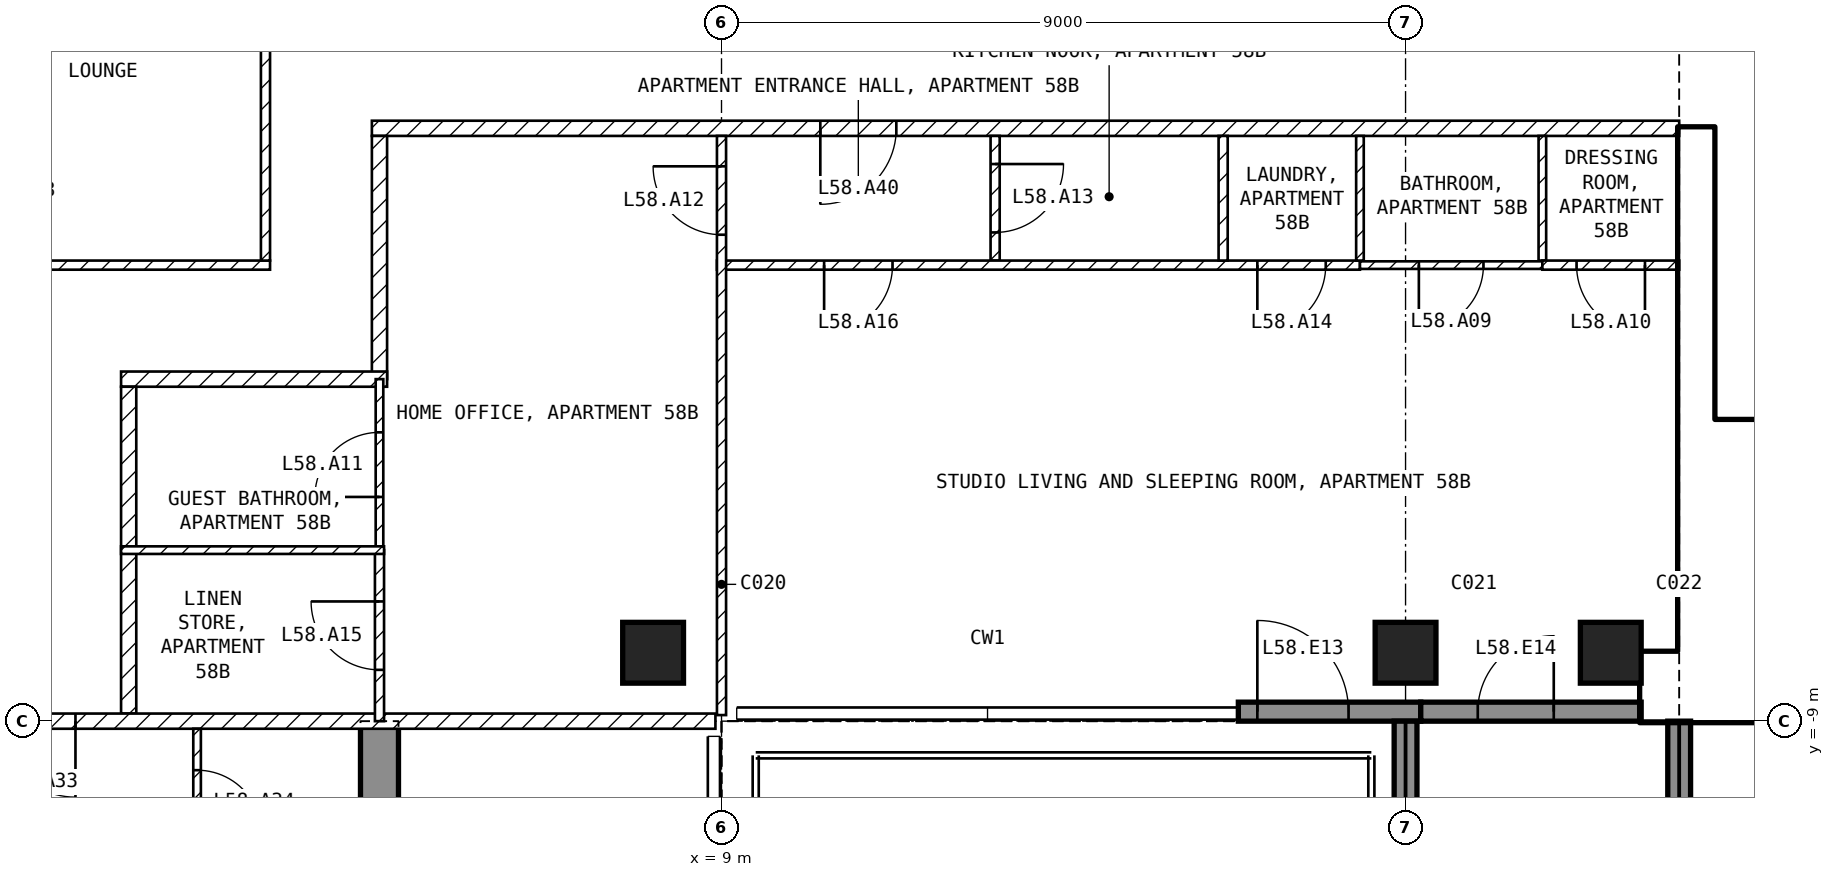
"""IFC4 building model, lengths in metres.
Left out: names, types, materials, properties, quantities, classifications, styles, units other than length and angle.
Written with IfcOpenShell. Run it as: python <this file> out.ifc"""

import sys

from ifc_helpers import new_model, si_unit, direction, frame, frame_2d, origin, origin_2d, place, context, subcontext, project, spatial, polyline, rectangle, outline, extrude, element, fill, save


model = new_model("IFC4")
c1 = context("Model", 3, precision=1e-05, world=origin(), true_north=direction((0.0, 1.0)))
c2 = subcontext(c1, "Body", "Model", "MODEL_VIEW")
j1 = project(units=[si_unit("LENGTHUNIT", "METRE"), si_unit("PLANEANGLEUNIT", "RADIAN")], contexts=[c1])
p1 = place(None, origin())
s1 = spatial("IfcSite", under=j1, at=p1, CompositionType="ELEMENT")
p2 = place(p1, origin())
s2 = spatial("IfcBuilding", under=s1, at=p2, CompositionType="ELEMENT")
p3 = place(p2, frame((0.0, 0.0, 232.5)))
s3 = spatial("IfcBuildingStorey", under=s2, at=p3, CompositionType="ELEMENT", Elevation=232.5)
for number, where, z_axis, x_axis in (
    (1, (8.1, -8.1, -0.25), (0.0, 0.0, 1.0), (1.0, 0.0, 0.0)),
    (2, (18.0, -8.1, -0.25), (0.0, 0.0, 1.0), (1.0, 0.0, 0.0)),
    (3, (20.7, -8.1, -0.25), (0.0, 0.0, 1.0), (1.0, 0.0, 0.0)),
):
    element("IfcColumn", number, at=place(p3, frame(where, z_axis=z_axis, x_axis=x_axis)), inside=s3, PredefinedType="COLUMN", context=c2, shape_type="SweptSolid", body=[
        extrude(rectangle(XDim=0.8, YDim=0.8, at=origin_2d()), origin(), (0.0, 0.0, 1.0), 3.5),
    ])
p4 = place(p3, frame((4.25, -16.7, -0.25), z_axis=(1.0, 0.0, 0.0), x_axis=(0.0, 1.0, 0.0)))
e4 = element("IfcWall", 4, at=p4, inside=s3, PredefinedType="SHEAR", context=c2, shape_type="SweptSolid", body=[
    extrude(outline(polyline([(0.0, 0.0), (3.2, 0.0), (3.2, 2.65), (5.6, 2.65), (5.6, 0.0), (7.7, 0.0), (7.7, 3.5), (0.0, 3.5), (0.0, 0.0)])), origin(), (0.0, 0.0, 1.0), 0.5),
])
p5 = place(p3, frame((15.8, -8.875, 0.0), z_axis=(0.0, 0.0, 1.0), x_axis=(1.0, 0.0, 0.0)))
e5 = element("IfcWall", 5, at=p5, inside=s3, PredefinedType="SOLIDWALL", context=c2, shape_type="SweptSolid", body=[
    extrude(rectangle(XDim=2.4, YDim=0.25, at=frame_2d((1.2, 0.0))), origin(), (0.0, 0.0, 1.0), 3.25),
])
p6 = place(p5, frame((0.25, 0.0, 0.0)))
e6 = element("IfcOpeningElement", 6, at=p6, cuts=e5, PredefinedType="OPENING", context=c2, shape_type="SweptSolid", body=[
    extrude(rectangle(XDim=1.2, YDim=2.4, at=frame_2d((0.6, 1.2))), frame((0.0, 0.135, 0.0), z_axis=(0.0, -1.0, 0.0), x_axis=(1.0, 0.0, 0.0)), (0.0, 0.0, 1.0), 0.27),
])
p7 = place(p3, frame((18.2, -8.875, 0.0), z_axis=(0.0, 0.0, 1.0), x_axis=(1.0, 0.0, 0.0)))
e7 = element("IfcWall", 7, at=p7, inside=s3, PredefinedType="SOLIDWALL", context=c2, shape_type="SweptSolid", body=[
    extrude(rectangle(XDim=2.9, YDim=0.25, at=frame_2d((1.45, 0.0))), origin(), (0.0, 0.0, 1.0), 3.25),
])
p8 = place(p7, frame((0.75, 0.0, 0.0)))
e8 = element("IfcOpeningElement", 8, at=p8, cuts=e7, PredefinedType="OPENING", context=c2, shape_type="SweptSolid", body=[
    extrude(rectangle(XDim=1.0, YDim=2.4, at=frame_2d((0.5, 1.2))), frame((0.0, 0.135, 0.0), z_axis=(0.0, -1.0, 0.0), x_axis=(1.0, 0.0, 0.0)), (0.0, 0.0, 1.0), 0.27),
])
p9 = place(p3, frame((18.0, -9.0, 0.0), z_axis=(0.0, 0.0, 1.0), x_axis=(0.0, -1.0, 0.0)))
e9 = element("IfcWall", 9, at=p9, inside=s3, PredefinedType="SOLIDWALL", context=c2, shape_type="SweptSolid", body=[
    extrude(rectangle(XDim=2.74, YDim=0.3, at=frame_2d((1.37, 0.0))), origin(), (0.0, 0.0, 1.0), 3.25),
])
p10 = place(p3, frame((21.6, -9.0, 0.0), z_axis=(0.0, 0.0, 1.0), x_axis=(0.0, -1.0, 0.0)))
e10 = element("IfcWall", 10, at=p10, inside=s3, PredefinedType="SOLIDWALL", context=c2, shape_type="SweptSolid", body=[
    extrude(rectangle(XDim=2.7, YDim=0.3, at=frame_2d((1.35, 0.0))), origin(), (0.0, 0.0, 1.0), 3.25),
])
p11 = place(p3, frame((21.1, -8.55, 0.0), z_axis=(0.0, 0.0, 1.0), x_axis=(1.0, 0.0, 0.0)))
e11 = element("IfcWall", 11, at=p11, inside=s3, PredefinedType="SHEAR", context=c2, shape_type="SweptSolid", body=[
    extrude(rectangle(XDim=9.1, YDim=0.9, at=frame_2d((4.55, 0.0))), origin(), (0.0, 0.0, 1.0), 3.25),
])
p12 = place(p3, frame((21.825, -8.1, 0.0), z_axis=(0.0, 0.0, 1.0), x_axis=(0.0, 1.0, 0.0)))
e12 = element("IfcWall", 12, at=p12, inside=s3, PredefinedType="SHEAR", context=c2, shape_type="SweptSolid", body=[
    extrude(rectangle(XDim=6.9, YDim=0.45, at=frame_2d((3.45, 0.0))), origin(), (0.0, 0.0, 1.0), 3.25),
])
p13 = place(p3, frame((22.05, -5.15, 0.0), z_axis=(0.0, 0.0, 1.0), x_axis=(1.0, 0.0, 0.0)))
e13 = element("IfcWall", 13, at=p13, inside=s3, PredefinedType="SOLIDWALL", context=c2, shape_type="SweptSolid", body=[
    extrude(rectangle(XDim=6.3, YDim=0.2, at=frame_2d((3.15, 0.0))), origin(), (0.0, 0.0, 1.0), 3.25),
])
p14 = place(p13, frame((0.2, 0.0, 0.0)))
e14 = element("IfcOpeningElement", 14, at=p14, cuts=e13, PredefinedType="OPENING", context=c2, shape_type="SweptSolid", body=[
    extrude(rectangle(XDim=1.0, YDim=2.1, at=frame_2d((0.5, 1.05))), frame((0.0, 0.11, 0.0), z_axis=(0.0, -1.0, 0.0), x_axis=(1.0, 0.0, 0.0)), (0.0, 0.0, 1.0), 0.22),
])
p15 = place(p3, frame((-3.06, -3.0, 0.0), z_axis=(0.0, 0.0, 1.0), x_axis=(1.0, 0.0, 0.0)))
e15 = element("IfcWall", 15, at=p15, inside=s3, PredefinedType="PARTITIONING", context=c2, shape_type="SweptSolid", body=[
    extrude(rectangle(XDim=6.12, YDim=0.12, at=frame_2d((3.06, 0.0))), origin(), (0.0, 0.0, 1.0), 3.25),
])
p16 = place(p3, frame((3.0, -2.94, 0.0), z_axis=(0.0, 0.0, 1.0), x_axis=(0.0, 1.0, 0.0)))
e16 = element("IfcWall", 16, at=p16, inside=s3, PredefinedType="PARTITIONING", context=c2, shape_type="SweptSolid", body=[
    extrude(rectangle(XDim=5.88, YDim=0.12, at=frame_2d((2.94, 0.0))), origin(), (0.0, 0.0, 1.0), 3.25),
])
p17 = place(p3, frame((21.6, -1.2, 0.0), z_axis=(0.0, 0.0, 1.0), x_axis=(-1.0, 0.0, 0.0)))
e17 = element("IfcWall", 17, at=p17, inside=s3, PredefinedType="PARTITIONING", context=c2, shape_type="SweptSolid", body=[
    extrude(rectangle(XDim=17.2, YDim=0.2, at=frame_2d((8.6, 0.0))), origin(), (0.0, 0.0, 1.0), 3.25),
])
p18 = place(p17, frame((10.3, 0.0, 0.0)))
e18 = element("IfcOpeningElement", 18, at=p18, cuts=e17, PredefinedType="OPENING", context=c2, shape_type="SweptSolid", body=[
    extrude(rectangle(XDim=1.0, YDim=2.1, at=frame_2d((0.5, 1.05))), frame((0.0, 0.11, 0.0), z_axis=(0.0, -1.0, 0.0), x_axis=(1.0, 0.0, 0.0)), (0.0, 0.0, 1.0), 0.22),
])
p19 = place(p3, frame((4.5, -1.3, 0.0), z_axis=(0.0, 0.0, 1.0), x_axis=(0.0, -1.0, 0.0)))
e19 = element("IfcWall", 19, at=p19, inside=s3, PredefinedType="PARTITIONING", context=c2, shape_type="SweptSolid", body=[
    extrude(rectangle(XDim=3.2, YDim=0.2, at=frame_2d((1.6, 0.0))), origin(), (0.0, 0.0, 1.0), 3.25),
])
p20 = place(p3, frame((4.6, -4.5, 0.0), z_axis=(0.0, 0.0, 1.0), x_axis=(-1.0, 0.0, 0.0)))
e20 = element("IfcWall", 20, at=p20, inside=s3, PredefinedType="PARTITIONING", context=c2, shape_type="SweptSolid", body=[
    extrude(rectangle(XDim=3.5, YDim=0.2, at=frame_2d((1.75, 0.0))), origin(), (0.0, 0.0, 1.0), 3.25),
])
p21 = place(p3, frame((1.2, -4.6, 0.0), z_axis=(0.0, 0.0, 1.0), x_axis=(0.0, -1.0, 0.0)))
e21 = element("IfcWall", 21, at=p21, inside=s3, PredefinedType="PARTITIONING", context=c2, shape_type="SweptSolid", body=[
    extrude(rectangle(XDim=4.3, YDim=0.2, at=frame_2d((2.15, 0.0))), origin(), (0.0, 0.0, 1.0), 3.25),
])
p22 = place(p3, frame((8.92, -9.0, 0.0), z_axis=(0.0, 0.0, 1.0), x_axis=(-1.0, 0.0, 0.0)))
e22 = element("IfcWall", 22, at=p22, inside=s3, PredefinedType="PARTITIONING", context=c2, shape_type="SweptSolid", body=[
    extrude(rectangle(XDim=17.84, YDim=0.2, at=frame_2d((8.92, 0.0))), origin(), (0.0, 0.0, 1.0), 3.25),
])
p23 = place(p22, frame((8.42, 0.0, 0.0)))
e23 = element("IfcOpeningElement", 23, at=p23, cuts=e22, PredefinedType="OPENING", context=c2, shape_type="SweptSolid", body=[
    extrude(rectangle(XDim=1.0, YDim=2.1, at=frame_2d((0.5, 1.05))), frame((0.0, 0.11, 0.0), z_axis=(0.0, -1.0, 0.0), x_axis=(1.0, 0.0, 0.0)), (0.0, 0.0, 1.0), 0.22),
])
p24 = place(p3, frame((12.6, -1.3, 0.0), z_axis=(0.0, 0.0, 1.0), x_axis=(0.0, -1.0, 0.0)))
e24 = element("IfcWall", 24, at=p24, inside=s3, PredefinedType="PARTITIONING", context=c2, shape_type="SweptSolid", body=[
    extrude(rectangle(XDim=1.64, YDim=0.12, at=frame_2d((0.82, 0.0))), origin(), (0.0, 0.0, 1.0), 3.25),
])
p25 = place(p24, frame((0.37, 0.0, 0.0)))
e25 = element("IfcOpeningElement", 25, at=p25, cuts=e24, PredefinedType="OPENING", context=c2, shape_type="SweptSolid", body=[
    extrude(rectangle(XDim=0.9, YDim=2.1, at=frame_2d((0.45, 1.05))), frame((0.0, 0.07, 0.0), z_axis=(0.0, -1.0, 0.0), x_axis=(1.0, 0.0, 0.0)), (0.0, 0.0, 1.0), 0.14),
])
p26 = place(p3, frame((17.4, -3.0, 0.0), z_axis=(0.0, 0.0, 1.0), x_axis=(-1.0, 0.0, 0.0)))
e26 = element("IfcWall", 26, at=p26, inside=s3, PredefinedType="PARTITIONING", context=c2, shape_type="SweptSolid", body=[
    extrude(rectangle(XDim=8.46, YDim=0.12, at=frame_2d((4.23, 0.0))), origin(), (0.0, 0.0, 1.0), 3.25),
])
p27 = place(p26, frame((0.45, 0.0, 0.0)))
e27 = element("IfcOpeningElement", 27, at=p27, cuts=e26, PredefinedType="OPENING", context=c2, shape_type="SweptSolid", body=[
    extrude(rectangle(XDim=0.9, YDim=2.1, at=frame_2d((0.45, 1.05))), frame((0.0, 0.07, 0.0), z_axis=(0.0, -1.0, 0.0), x_axis=(1.0, 0.0, 0.0)), (0.0, 0.0, 1.0), 0.14),
])
p28 = place(p26, frame((6.15, 0.0, 0.0)))
e28 = element("IfcOpeningElement", 28, at=p28, cuts=e26, PredefinedType="OPENING", context=c2, shape_type="SweptSolid", body=[
    extrude(rectangle(XDim=0.9, YDim=2.1, at=frame_2d((0.45, 1.05))), frame((0.0, 0.07, 0.0), z_axis=(0.0, -1.0, 0.0), x_axis=(1.0, 0.0, 0.0)), (0.0, 0.0, 1.0), 0.14),
])
p29 = place(p3, frame((9.0, -8.92, 0.0), z_axis=(0.0, 0.0, 1.0), x_axis=(0.0, 1.0, 0.0)))
e29 = element("IfcWall", 29, at=p29, inside=s3, PredefinedType="PARTITIONING", context=c2, shape_type="SweptSolid", body=[
    extrude(rectangle(XDim=7.62, YDim=0.12, at=frame_2d((3.81, 0.0))), origin(), (0.0, 0.0, 1.0), 3.25),
])
p30 = place(p29, frame((6.32, 0.0, 0.0)))
e30 = element("IfcOpeningElement", 30, at=p30, cuts=e29, PredefinedType="OPENING", context=c2, shape_type="SweptSolid", body=[
    extrude(rectangle(XDim=0.9, YDim=2.1, at=frame_2d((0.45, 1.05))), frame((0.0, 0.07, 0.0), z_axis=(0.0, -1.0, 0.0), x_axis=(1.0, 0.0, 0.0)), (0.0, 0.0, 1.0), 0.14),
])
p31 = place(p3, frame((15.6, -1.3, 0.0), z_axis=(0.0, 0.0, 1.0), x_axis=(0.0, -1.0, 0.0)))
e31 = element("IfcWall", 31, at=p31, inside=s3, PredefinedType="PARTITIONING", context=c2, shape_type="SweptSolid", body=[
    extrude(rectangle(XDim=1.64, YDim=0.12, at=frame_2d((0.82, 0.0))), origin(), (0.0, 0.0, 1.0), 3.25),
])
for number, where, z_axis, x_axis in (
    (32, (17.4, -1.3, 0.0), (0.0, 0.0, 1.0), (0.0, -1.0, 0.0)),
    (33, (19.8, -1.3, 0.0), (0.0, 0.0, 1.0), (0.0, -1.0, 0.0)),
):
    element("IfcWall", number, at=place(p3, frame(where, z_axis=z_axis, x_axis=x_axis)), inside=s3, PredefinedType="PARTITIONING", context=c2, shape_type="SweptSolid", body=[
        extrude(rectangle(XDim=1.64, YDim=0.1, at=frame_2d((0.82, 0.0))), origin(), (0.0, 0.0, 1.0), 3.25),
    ])
p32 = place(p3, frame((19.8, -3.0, 0.0), z_axis=(0.0, 0.0, 1.0), x_axis=(-1.0, 0.0, 0.0)))
e34 = element("IfcWall", 34, at=p32, inside=s3, PredefinedType="PARTITIONING", context=c2, shape_type="SweptSolid", body=[
    extrude(rectangle(XDim=2.4, YDim=0.1, at=frame_2d((1.2, 0.0))), origin(), (0.0, 0.0, 1.0), 3.25),
])
p33 = place(p32, frame((0.775, 0.0, 0.0)))
e35 = element("IfcOpeningElement", 35, at=p33, cuts=e34, PredefinedType="OPENING", context=c2, shape_type="SweptSolid", body=[
    extrude(rectangle(XDim=0.85, YDim=2.1, at=frame_2d((0.425, 1.05))), frame((0.0, 0.06, 0.0), z_axis=(0.0, -1.0, 0.0), x_axis=(1.0, 0.0, 0.0)), (0.0, 0.0, 1.0), 0.12),
])
p34 = place(p3, frame((21.6, -3.0, 0.0), z_axis=(0.0, 0.0, 1.0), x_axis=(-1.0, 0.0, 0.0)))
e36 = element("IfcWall", 36, at=p34, inside=s3, PredefinedType="PARTITIONING", context=c2, shape_type="SweptSolid", body=[
    extrude(rectangle(XDim=1.8, YDim=0.12, at=frame_2d((0.9, 0.0))), origin(), (0.0, 0.0, 1.0), 3.25),
])
p35 = place(p34, frame((0.45, 0.0, 0.0)))
e37 = element("IfcOpeningElement", 37, at=p35, cuts=e36, PredefinedType="OPENING", context=c2, shape_type="SweptSolid", body=[
    extrude(rectangle(XDim=0.9, YDim=2.1, at=frame_2d((0.45, 1.05))), frame((0.0, 0.07, 0.0), z_axis=(0.0, -1.0, 0.0), x_axis=(1.0, 0.0, 0.0)), (0.0, 0.0, 1.0), 0.14),
])
p36 = place(p3, frame((4.5, -6.75, 0.0), z_axis=(0.0, 0.0, 1.0), x_axis=(0.0, 1.0, 0.0)))
e38 = element("IfcWall", 38, at=p36, inside=s3, PredefinedType="PARTITIONING", context=c2, shape_type="SweptSolid", body=[
    extrude(rectangle(XDim=2.25, YDim=0.1, at=frame_2d((1.125, 0.0))), origin(), (0.0, 0.0, 1.0), 3.25),
])
p37 = place(p36, frame((0.7, 0.0, 0.0)))
e39 = element("IfcOpeningElement", 39, at=p37, cuts=e38, PredefinedType="OPENING", context=c2, shape_type="SweptSolid", body=[
    extrude(rectangle(XDim=0.85, YDim=2.1, at=frame_2d((0.425, 1.05))), frame((0.0, 0.06, 0.0), z_axis=(0.0, -1.0, 0.0), x_axis=(1.0, 0.0, 0.0)), (0.0, 0.0, 1.0), 0.12),
])
p38 = place(p3, frame((4.5, -9.0, 0.0), z_axis=(0.0, 0.0, 1.0), x_axis=(0.0, 1.0, 0.0)))
e40 = element("IfcWall", 40, at=p38, inside=s3, PredefinedType="PARTITIONING", context=c2, shape_type="SweptSolid", body=[
    extrude(rectangle(XDim=2.25, YDim=0.12, at=frame_2d((1.125, 0.0))), origin(), (0.0, 0.0, 1.0), 3.25),
])
p39 = place(p38, frame((0.675, 0.0, 0.0)))
e41 = element("IfcOpeningElement", 41, at=p39, cuts=e40, PredefinedType="OPENING", context=c2, shape_type="SweptSolid", body=[
    extrude(rectangle(XDim=0.9, YDim=2.1, at=frame_2d((0.45, 1.05))), frame((0.0, 0.07, 0.0), z_axis=(0.0, -1.0, 0.0), x_axis=(1.0, 0.0, 0.0)), (0.0, 0.0, 1.0), 0.14),
])
p40 = place(p3, frame((4.56, -6.75, 0.0), z_axis=(0.0, 0.0, 1.0), x_axis=(-1.0, 0.0, 0.0)))
e42 = element("IfcWall", 42, at=p40, inside=s3, PredefinedType="PARTITIONING", context=c2, shape_type="SweptSolid", body=[
    extrude(rectangle(XDim=3.46, YDim=0.1, at=frame_2d((1.73, 0.0))), origin(), (0.0, 0.0, 1.0), 3.25),
])
p41 = place(p3, frame((2.1, -9.1, 0.0), z_axis=(0.0, 0.0, 1.0), x_axis=(0.0, -1.0, 0.0)))
e43 = element("IfcWall", 43, at=p41, inside=s3, PredefinedType="PARTITIONING", context=c2, shape_type="SweptSolid", body=[
    extrude(rectangle(XDim=1.94, YDim=0.1, at=frame_2d((0.97, 0.0))), origin(), (0.0, 0.0, 1.0), 3.25),
])
p42 = place(p41, frame((0.545, 0.0, 0.0)))
e44 = element("IfcOpeningElement", 44, at=p42, cuts=e43, PredefinedType="OPENING", context=c2, shape_type="SweptSolid", body=[
    extrude(rectangle(XDim=0.85, YDim=2.1, at=frame_2d((0.425, 1.05))), frame((0.0, 0.06, 0.0), z_axis=(0.0, -1.0, 0.0), x_axis=(1.0, 0.0, 0.0)), (0.0, 0.0, 1.0), 0.12),
])
p43 = place(p6, origin())
e45 = element("IfcDoor", 45, at=p43, inside=s3, OperationType="SINGLE_SWING_LEFT", PredefinedType="DOOR", context=c2, shape_type="SweptSolid", body=[
    extrude(rectangle(XDim=1.2, YDim=2.4, at=frame_2d((0.6, 1.2))), frame((0.0, 0.025, 0.0), z_axis=(0.0, -1.0, 0.0), x_axis=(1.0, 0.0, 0.0)), (0.0, 0.0, 1.0), 0.05),
])
fill(e6, e45)
p44 = place(p8, origin())
e46 = element("IfcDoor", 46, at=p44, inside=s3, OperationType="SINGLE_SWING_RIGHT", PredefinedType="DOOR", context=c2, shape_type="SweptSolid", body=[
    extrude(rectangle(XDim=1.0, YDim=2.4, at=frame_2d((0.5, 1.2))), frame((0.0, 0.025, 0.0), z_axis=(0.0, -1.0, 0.0), x_axis=(1.0, 0.0, 0.0)), (0.0, 0.0, 1.0), 0.05),
])
fill(e8, e46)
p45 = place(p14, origin())
e47 = element("IfcDoor", 47, at=p45, inside=s3, OperationType="SINGLE_SWING_LEFT", PredefinedType="DOOR", context=c2, shape_type="SweptSolid", body=[
    extrude(rectangle(XDim=1.0, YDim=2.1, at=frame_2d((0.5, 1.05))), frame((0.0, 0.025, 0.0), z_axis=(0.0, -1.0, 0.0), x_axis=(1.0, 0.0, 0.0)), (0.0, 0.0, 1.0), 0.05),
])
fill(e14, e47)
p46 = place(p33, origin())
e48 = element("IfcDoor", 48, at=p46, inside=s3, OperationType="SINGLE_SWING_RIGHT", PredefinedType="DOOR", context=c2, shape_type="SweptSolid", body=[
    extrude(rectangle(XDim=0.85, YDim=2.1, at=frame_2d((0.425, 1.05))), frame((0.0, 0.025, 0.0), z_axis=(0.0, -1.0, 0.0), x_axis=(1.0, 0.0, 0.0)), (0.0, 0.0, 1.0), 0.05),
])
fill(e35, e48)
p47 = place(p35, origin())
e49 = element("IfcDoor", 49, at=p47, inside=s3, OperationType="SINGLE_SWING_LEFT", PredefinedType="DOOR", context=c2, shape_type="SweptSolid", body=[
    extrude(rectangle(XDim=0.9, YDim=2.1, at=frame_2d((0.45, 1.05))), frame((0.0, 0.025, 0.0), z_axis=(0.0, -1.0, 0.0), x_axis=(1.0, 0.0, 0.0)), (0.0, 0.0, 1.0), 0.05),
])
fill(e37, e49)
p48 = place(p37, origin())
e50 = element("IfcDoor", 50, at=p48, inside=s3, OperationType="SINGLE_SWING_LEFT", PredefinedType="DOOR", context=c2, shape_type="SweptSolid", body=[
    extrude(rectangle(XDim=0.85, YDim=2.1, at=frame_2d((0.425, 1.05))), frame((0.0, 0.025, 0.0), z_axis=(0.0, -1.0, 0.0), x_axis=(1.0, 0.0, 0.0)), (0.0, 0.0, 1.0), 0.05),
])
fill(e39, e50)
p49 = place(p30, origin())
e51 = element("IfcDoor", 51, at=p49, inside=s3, OperationType="SINGLE_SWING_RIGHT", PredefinedType="DOOR", context=c2, shape_type="SweptSolid", body=[
    extrude(rectangle(XDim=0.9, YDim=2.1, at=frame_2d((0.45, 1.05))), frame((0.0, 0.025, 0.0), z_axis=(0.0, -1.0, 0.0), x_axis=(1.0, 0.0, 0.0)), (0.0, 0.0, 1.0), 0.05),
])
fill(e30, e51)
p50 = place(p25, origin())
e52 = element("IfcDoor", 52, at=p50, inside=s3, OperationType="SINGLE_SWING_LEFT", PredefinedType="DOOR", context=c2, shape_type="SweptSolid", body=[
    extrude(rectangle(XDim=0.9, YDim=2.1, at=frame_2d((0.45, 1.05))), frame((0.0, 0.025, 0.0), z_axis=(0.0, -1.0, 0.0), x_axis=(1.0, 0.0, 0.0)), (0.0, 0.0, 1.0), 0.05),
])
fill(e25, e52)
p51 = place(p27, origin())
e53 = element("IfcDoor", 53, at=p51, inside=s3, OperationType="SINGLE_SWING_RIGHT", PredefinedType="DOOR", context=c2, shape_type="SweptSolid", body=[
    extrude(rectangle(XDim=0.9, YDim=2.1, at=frame_2d((0.45, 1.05))), frame((0.0, 0.025, 0.0), z_axis=(0.0, -1.0, 0.0), x_axis=(1.0, 0.0, 0.0)), (0.0, 0.0, 1.0), 0.05),
])
fill(e27, e53)
p52 = place(p39, origin())
e54 = element("IfcDoor", 54, at=p52, inside=s3, OperationType="SINGLE_SWING_RIGHT", PredefinedType="DOOR", context=c2, shape_type="SweptSolid", body=[
    extrude(rectangle(XDim=0.9, YDim=2.1, at=frame_2d((0.45, 1.05))), frame((0.0, 0.025, 0.0), z_axis=(0.0, -1.0, 0.0), x_axis=(1.0, 0.0, 0.0)), (0.0, 0.0, 1.0), 0.05),
])
fill(e41, e54)
p53 = place(p28, origin())
e55 = element("IfcDoor", 55, at=p53, inside=s3, OperationType="SINGLE_SWING_RIGHT", PredefinedType="DOOR", context=c2, shape_type="SweptSolid", body=[
    extrude(rectangle(XDim=0.9, YDim=2.1, at=frame_2d((0.45, 1.05))), frame((0.0, 0.025, 0.0), z_axis=(0.0, -1.0, 0.0), x_axis=(1.0, 0.0, 0.0)), (0.0, 0.0, 1.0), 0.05),
])
fill(e28, e55)
p54 = place(p23, origin())
e56 = element("IfcDoor", 56, at=p54, inside=s3, OperationType="SINGLE_SWING_LEFT", PredefinedType="DOOR", context=c2, shape_type="SweptSolid", body=[
    extrude(rectangle(XDim=1.0, YDim=2.1, at=frame_2d((0.5, 1.05))), frame((0.0, 0.025, 0.0), z_axis=(0.0, -1.0, 0.0), x_axis=(1.0, 0.0, 0.0)), (0.0, 0.0, 1.0), 0.05),
])
fill(e23, e56)
p55 = place(p42, origin())
e57 = element("IfcDoor", 57, at=p55, inside=s3, OperationType="SINGLE_SWING_RIGHT", PredefinedType="DOOR", context=c2, shape_type="SweptSolid", body=[
    extrude(rectangle(XDim=0.85, YDim=2.1, at=frame_2d((0.425, 1.05))), frame((0.0, 0.025, 0.0), z_axis=(0.0, -1.0, 0.0), x_axis=(1.0, 0.0, 0.0)), (0.0, 0.0, 1.0), 0.05),
])
fill(e44, e57)
p56 = place(p18, origin())
e58 = element("IfcDoor", 58, at=p56, inside=s3, OperationType="SINGLE_SWING_RIGHT", PredefinedType="DOOR", context=c2, shape_type="SweptSolid", body=[
    extrude(rectangle(XDim=1.0, YDim=2.1, at=frame_2d((0.5, 1.05))), frame((0.0, 0.025, 0.0), z_axis=(0.0, -1.0, 0.0), x_axis=(1.0, 0.0, 0.0)), (0.0, 0.0, 1.0), 0.05),
])
fill(e18, e58)
save(model, sys.argv[1])
